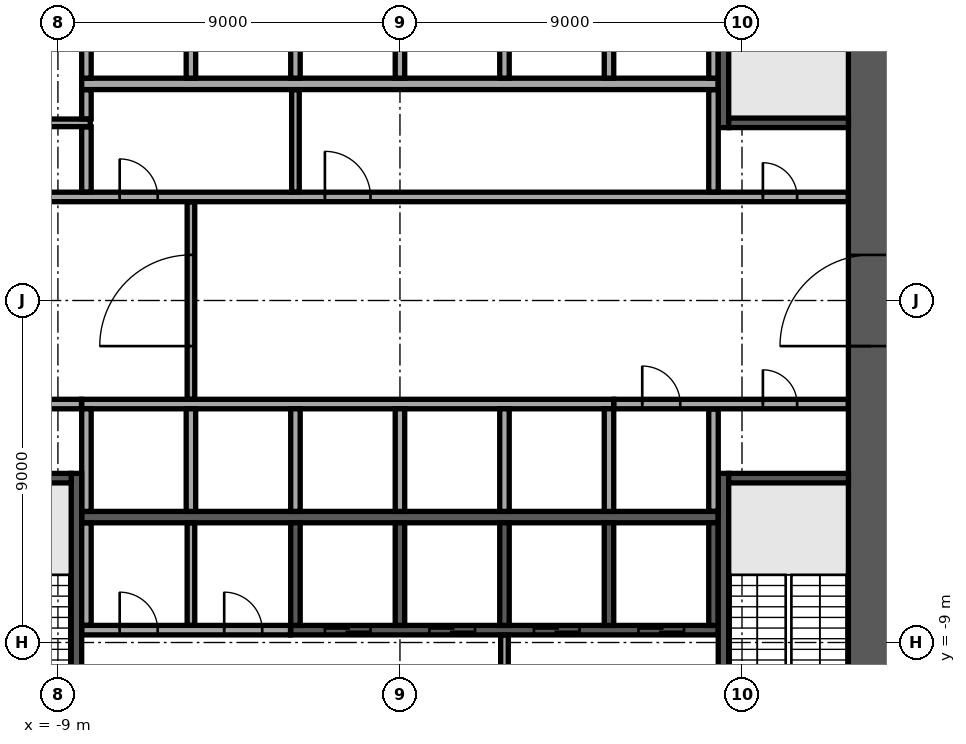
"""IFC4 building model, lengths in metres.
Left out: names, types, materials, properties, quantities, classifications, styles, units other than length and angle.
Written with IfcOpenShell. Run it as: python <this file> out.ifc"""

import sys

from ifc_helpers import new_model, si_unit, direction, frame, frame_2d, origin, place, context, subcontext, project, spatial, rectangle, extrude, element, fill, save


model = new_model("IFC4")
c1 = context("Model", 3, precision=1e-05, world=origin(), true_north=direction((0.0, 1.0)))
c2 = subcontext(c1, "Body", "Model", "MODEL_VIEW")
j1 = project(units=[si_unit("LENGTHUNIT", "METRE"), si_unit("PLANEANGLEUNIT", "RADIAN")], contexts=[c1])
p1 = place(None, origin())
s1 = spatial("IfcSite", under=j1, at=p1, CompositionType="ELEMENT")
p2 = place(p1, origin())
s2 = spatial("IfcBuilding", under=s1, at=p2, CompositionType="ELEMENT")
p3 = place(p2, frame((0.0, 0.0, 13.5)))
s3 = spatial("IfcBuildingStorey", under=s2, at=p3, CompositionType="ELEMENT", Elevation=13.5)
p4 = place(p3, frame((12.4, -11.8, 0.0), z_axis=(0.0, 0.0, 1.0), x_axis=(0.0, 1.0, 0.0)))
e1 = element("IfcWall", 1, at=p4, inside=s3, PredefinedType="SHEAR", context=c2, shape_type="SweptSolid", body=[
    extrude(rectangle(XDim=23.6, YDim=1.2, at=frame_2d((11.8, 0.0))), origin(), (0.0, 0.0, 1.0), 4.1),
])
p5 = place(p4, frame((10.6, 0.0, 0.0)))
e2 = element("IfcOpeningElement", 2, at=p5, cuts=e1, PredefinedType="OPENING", context=c2, shape_type="SweptSolid", body=[
    extrude(rectangle(XDim=2.4, YDim=2.4, at=frame_2d((1.2, 1.2))), frame((0.0, 0.61, 0.0), z_axis=(0.0, -1.0, 0.0), x_axis=(1.0, 0.0, 0.0)), (0.0, 0.0, 1.0), 1.22),
])
for number, where, z_axis, x_axis in (
    (3, (-8.375, 5.7, 0.0), (0.0, 0.0, 1.0), (1.0, 0.0, 0.0)),
    (4, (-8.375, -5.7, 0.0), (0.0, 0.0, 1.0), (1.0, 0.0, 0.0)),
):
    element("IfcWall", number, at=place(p3, frame(where, z_axis=z_axis, x_axis=x_axis)), inside=s3, PredefinedType="SOLIDWALL", context=c2, shape_type="SweptSolid", body=[
        extrude(rectangle(XDim=16.75, YDim=0.3, at=frame_2d((8.375, 0.0))), origin(), (0.0, 0.0, 1.0), 4.1),
    ])
for number, where, z_axis, x_axis in (
    (5, (-8.25, 5.85, 0.0), (0.0, 0.0, 1.0), (0.0, 1.0, 0.0)),
    (6, (-5.5, 5.85, 0.0), (0.0, 0.0, 1.0), (0.0, 1.0, 0.0)),
    (7, (-2.75, 5.85, 0.0), (0.0, 0.0, 1.0), (0.0, 1.0, 0.0)),
    (8, (0.0, 5.85, 0.0), (0.0, 0.0, 1.0), (0.0, 1.0, 0.0)),
    (9, (2.75, 5.85, 0.0), (0.0, 0.0, 1.0), (0.0, 1.0, 0.0)),
    (10, (5.5, 5.85, 0.0), (0.0, 0.0, 1.0), (0.0, 1.0, 0.0)),
    (11, (8.25, 5.85, 0.0), (0.0, 0.0, 1.0), (0.0, 1.0, 0.0)),
):
    element("IfcWall", number, at=place(p3, frame(where, z_axis=z_axis, x_axis=x_axis)), inside=s3, PredefinedType="SOLIDWALL", context=c2, shape_type="SweptSolid", body=[
        extrude(rectangle(XDim=2.7, YDim=0.25, at=frame_2d((1.35, 0.0))), origin(), (0.0, 0.0, 1.0), 4.1),
    ])
p6 = place(p3, frame((-8.375, -2.725, 0.0), z_axis=(0.0, 0.0, 1.0), x_axis=(1.0, 0.0, 0.0)))
e12 = element("IfcWall", 12, at=p6, inside=s3, PredefinedType="SOLIDWALL", context=c2, shape_type="SweptSolid", body=[
    extrude(rectangle(XDim=14.0, YDim=0.25, at=frame_2d((7.0, 0.0))), origin(), (0.0, 0.0, 1.0), 4.1),
])
for number, where, z_axis, x_axis in (
    (13, (-8.25, -5.55, 0.0), (0.0, 0.0, 1.0), (0.0, 1.0, 0.0)),
    (14, (-5.5, -5.55, 0.0), (0.0, 0.0, 1.0), (0.0, 1.0, 0.0)),
    (15, (-2.75, -5.55, 0.0), (0.0, 0.0, 1.0), (0.0, 1.0, 0.0)),
    (16, (0.0, -5.55, 0.0), (0.0, 0.0, 1.0), (0.0, 1.0, 0.0)),
    (17, (2.75, -5.55, 0.0), (0.0, 0.0, 1.0), (0.0, 1.0, 0.0)),
    (18, (5.5, -5.55, 0.0), (0.0, 0.0, 1.0), (0.0, 1.0, 0.0)),
):
    element("IfcWall", number, at=place(p3, frame(where, z_axis=z_axis, x_axis=x_axis)), inside=s3, PredefinedType="SOLIDWALL", context=c2, shape_type="SweptSolid", body=[
        extrude(rectangle(XDim=2.7, YDim=0.25, at=frame_2d((1.35, 0.0))), origin(), (0.0, 0.0, 1.0), 4.1),
    ])
p7 = place(p3, frame((-2.875, -8.675, 0.0), z_axis=(0.0, 0.0, 1.0), x_axis=(1.0, 0.0, 0.0)))
e19 = element("IfcWall", 19, at=p7, inside=s3, PredefinedType="SOLIDWALL", context=c2, shape_type="SweptSolid", body=[
    extrude(rectangle(XDim=11.25, YDim=0.25, at=frame_2d((5.625, 0.0))), origin(), (0.0, 0.0, 1.0), 4.1),
])
p8 = place(p7, frame((0.9, 0.0, 0.0)))
e20 = element("IfcOpeningElement", 20, at=p8, cuts=e19, PredefinedType="OPENING", context=c2, shape_type="SweptSolid", body=[
    extrude(rectangle(XDim=1.2, YDim=2.1, at=frame_2d((0.6, 1.05))), frame((0.0, 0.135, 0.0), z_axis=(0.0, -1.0, 0.0), x_axis=(1.0, 0.0, 0.0)), (0.0, 0.0, 1.0), 0.27),
])
p9 = place(p7, frame((3.65, 0.0, 0.0)))
e21 = element("IfcOpeningElement", 21, at=p9, cuts=e19, PredefinedType="OPENING", context=c2, shape_type="SweptSolid", body=[
    extrude(rectangle(XDim=1.2, YDim=2.1, at=frame_2d((0.6, 1.05))), frame((0.0, 0.135, 0.0), z_axis=(0.0, -1.0, 0.0), x_axis=(1.0, 0.0, 0.0)), (0.0, 0.0, 1.0), 0.27),
])
p10 = place(p7, frame((6.4, 0.0, 0.0)))
e22 = element("IfcOpeningElement", 22, at=p10, cuts=e19, PredefinedType="OPENING", context=c2, shape_type="SweptSolid", body=[
    extrude(rectangle(XDim=1.2, YDim=2.1, at=frame_2d((0.6, 1.05))), frame((0.0, 0.135, 0.0), z_axis=(0.0, -1.0, 0.0), x_axis=(1.0, 0.0, 0.0)), (0.0, 0.0, 1.0), 0.27),
])
p11 = place(p7, frame((9.15, 0.0, 0.0)))
e23 = element("IfcOpeningElement", 23, at=p11, cuts=e19, PredefinedType="OPENING", context=c2, shape_type="SweptSolid", body=[
    extrude(rectangle(XDim=1.2, YDim=2.1, at=frame_2d((0.6, 1.05))), frame((0.0, 0.135, 0.0), z_axis=(0.0, -1.0, 0.0), x_axis=(1.0, 0.0, 0.0)), (0.0, 0.0, 1.0), 0.27),
])
for number, where, z_axis, x_axis in (
    (24, (-2.75, -8.55, 0.0), (0.0, 0.0, 1.0), (0.0, 1.0, 0.0)),
    (25, (0.0, -8.55, 0.0), (0.0, 0.0, 1.0), (0.0, 1.0, 0.0)),
    (26, (2.75, -8.55, 0.0), (0.0, 0.0, 1.0), (0.0, 1.0, 0.0)),
    (27, (5.5, -8.55, 0.0), (0.0, 0.0, 1.0), (0.0, 1.0, 0.0)),
    (28, (8.25, -8.55, 0.0), (0.0, 0.0, 1.0), (0.0, 1.0, 0.0)),
):
    element("IfcWall", number, at=place(p3, frame(where, z_axis=z_axis, x_axis=x_axis)), inside=s3, PredefinedType="SOLIDWALL", context=c2, shape_type="SweptSolid", body=[
        extrude(rectangle(XDim=2.7, YDim=0.25, at=frame_2d((1.35, 0.0))), origin(), (0.0, 0.0, 1.0), 4.1),
    ])
p12 = place(p3, frame((8.512, 4.55, 0.0), z_axis=(0.0, 0.0, 1.0), x_axis=(0.0, 1.0, 0.0)))
e29 = element("IfcWall", 29, at=p12, inside=s3, PredefinedType="SOLIDWALL", context=c2, shape_type="SweptSolid", body=[
    extrude(rectangle(XDim=7.25, YDim=0.275, at=frame_2d((3.625, 0.0))), origin(), (0.0, 0.0, 1.0), 4.1),
])
p13 = place(p12, frame((6.0, 0.0, 0.0)))
e30 = element("IfcOpeningElement", 30, at=p13, cuts=e29, PredefinedType="OPENING", context=c2, shape_type="SweptSolid", body=[
    extrude(rectangle(XDim=1.0, YDim=2.1, at=frame_2d((0.5, 1.05))), frame((0.0, 0.147, 0.0), z_axis=(0.0, -1.0, 0.0), x_axis=(1.0, 0.0, 0.0)), (0.0, 0.0, 1.0), 0.295),
])
p14 = place(p3, frame((8.65, 4.675, 0.0), z_axis=(0.0, 0.0, 1.0), x_axis=(1.0, 0.0, 0.0)))
e31 = element("IfcWall", 31, at=p14, inside=s3, PredefinedType="SOLIDWALL", context=c2, shape_type="SweptSolid", body=[
    extrude(rectangle(XDim=3.15, YDim=0.25, at=frame_2d((1.575, 0.0))), origin(), (0.0, 0.0, 1.0), 4.1),
])
p15 = place(p3, frame((-8.512, -4.55, 0.0), z_axis=(0.0, 0.0, 1.0), x_axis=(0.0, -1.0, 0.0)))
e32 = element("IfcWall", 32, at=p15, inside=s3, PredefinedType="SOLIDWALL", context=c2, shape_type="SweptSolid", body=[
    extrude(rectangle(XDim=7.25, YDim=0.275, at=frame_2d((3.625, 0.0))), origin(), (0.0, 0.0, 1.0), 4.1),
])
p16 = place(p15, frame((6.0, 0.0, 0.0)))
e33 = element("IfcOpeningElement", 33, at=p16, cuts=e32, PredefinedType="OPENING", context=c2, shape_type="SweptSolid", body=[
    extrude(rectangle(XDim=1.0, YDim=2.1, at=frame_2d((0.5, 1.05))), frame((0.0, 0.147, 0.0), z_axis=(0.0, -1.0, 0.0), x_axis=(1.0, 0.0, 0.0)), (0.0, 0.0, 1.0), 0.295),
])
p17 = place(p3, frame((-8.65, -4.675, 0.0), z_axis=(0.0, 0.0, 1.0), x_axis=(-1.0, 0.0, 0.0)))
e34 = element("IfcWall", 34, at=p17, inside=s3, PredefinedType="SOLIDWALL", context=c2, shape_type="SweptSolid", body=[
    extrude(rectangle(XDim=3.15, YDim=0.25, at=frame_2d((1.575, 0.0))), origin(), (0.0, 0.0, 1.0), 4.1),
])
p18 = place(p3, frame((8.512, -4.55, 0.0), z_axis=(0.0, 0.0, 1.0), x_axis=(0.0, -1.0, 0.0)))
e35 = element("IfcWall", 35, at=p18, inside=s3, PredefinedType="SOLIDWALL", context=c2, shape_type="SweptSolid", body=[
    extrude(rectangle(XDim=7.25, YDim=0.275, at=frame_2d((3.625, 0.0))), origin(), (0.0, 0.0, 1.0), 4.1),
])
p19 = place(p18, frame((6.0, 0.0, 0.0)))
e36 = element("IfcOpeningElement", 36, at=p19, cuts=e35, PredefinedType="OPENING", context=c2, shape_type="SweptSolid", body=[
    extrude(rectangle(XDim=1.0, YDim=2.1, at=frame_2d((0.5, 1.05))), frame((0.0, 0.147, 0.0), z_axis=(0.0, -1.0, 0.0), x_axis=(1.0, 0.0, 0.0)), (0.0, 0.0, 1.0), 0.295),
])
p20 = place(p3, frame((8.65, -4.675, 0.0), z_axis=(0.0, 0.0, 1.0), x_axis=(1.0, 0.0, 0.0)))
e37 = element("IfcWall", 37, at=p20, inside=s3, PredefinedType="SOLIDWALL", context=c2, shape_type="SweptSolid", body=[
    extrude(rectangle(XDim=3.15, YDim=0.25, at=frame_2d((1.575, 0.0))), origin(), (0.0, 0.0, 1.0), 4.1),
])
p21 = place(p3, frame((2.75, -11.795, 0.0), z_axis=(0.0, 0.0, 1.0), x_axis=(0.0, 1.0, 0.0)))
e38 = element("IfcWall", 38, at=p21, inside=s3, PredefinedType="PARTITIONING", context=c2, shape_type="SweptSolid", body=[
    extrude(rectangle(XDim=2.99, YDim=0.2, at=frame_2d((1.495, 0.0))), origin(), (0.0, 0.0, 1.0), 4.1),
])
p22 = place(p3, frame((-8.37, -8.675, 0.0), z_axis=(0.0, 0.0, 1.0), x_axis=(1.0, 0.0, 0.0)))
e39 = element("IfcWall", 39, at=p22, inside=s3, PredefinedType="PARTITIONING", context=c2, shape_type="SweptSolid", body=[
    extrude(rectangle(XDim=5.49, YDim=0.25, at=frame_2d((2.745, 0.0))), origin(), (0.0, 0.0, 1.0), 4.1),
])
p23 = place(p22, frame((0.995, 0.0, 0.0)))
e40 = element("IfcOpeningElement", 40, at=p23, cuts=e39, PredefinedType="OPENING", context=c2, shape_type="SweptSolid", body=[
    extrude(rectangle(XDim=1.0, YDim=2.1, at=frame_2d((0.5, 1.05))), frame((0.0, 0.135, 0.0), z_axis=(0.0, -1.0, 0.0), x_axis=(1.0, 0.0, 0.0)), (0.0, 0.0, 1.0), 0.27),
])
p24 = place(p22, frame((3.745, 0.0, 0.0)))
e41 = element("IfcOpeningElement", 41, at=p24, cuts=e39, PredefinedType="OPENING", context=c2, shape_type="SweptSolid", body=[
    extrude(rectangle(XDim=1.0, YDim=2.1, at=frame_2d((0.5, 1.05))), frame((0.0, 0.135, 0.0), z_axis=(0.0, -1.0, 0.0), x_axis=(1.0, 0.0, 0.0)), (0.0, 0.0, 1.0), 0.27),
])
p25 = place(p3, frame((-8.25, -8.545, 0.0), z_axis=(0.0, 0.0, 1.0), x_axis=(0.0, 1.0, 0.0)))
e42 = element("IfcWall", 42, at=p25, inside=s3, PredefinedType="PARTITIONING", context=c2, shape_type="SweptSolid", body=[
    extrude(rectangle(XDim=2.69, YDim=0.25, at=frame_2d((1.345, 0.0))), origin(), (0.0, 0.0, 1.0), 4.1),
])
p26 = place(p3, frame((-5.5, -8.545, 0.0), z_axis=(0.0, 0.0, 1.0), x_axis=(0.0, 1.0, 0.0)))
e43 = element("IfcWall", 43, at=p26, inside=s3, PredefinedType="PARTITIONING", context=c2, shape_type="SweptSolid", body=[
    extrude(rectangle(XDim=2.69, YDim=0.2, at=frame_2d((1.345, 0.0))), origin(), (0.0, 0.0, 1.0), 4.1),
])
p27 = place(p3, frame((8.25, -5.545, 0.0), z_axis=(0.0, 0.0, 1.0), x_axis=(0.0, 1.0, 0.0)))
e44 = element("IfcWall", 44, at=p27, inside=s3, PredefinedType="PARTITIONING", context=c2, shape_type="SweptSolid", body=[
    extrude(rectangle(XDim=2.69, YDim=0.25, at=frame_2d((1.345, 0.0))), origin(), (0.0, 0.0, 1.0), 4.1),
])
p28 = place(p3, frame((-11.795, -2.725, 0.0), z_axis=(0.0, 0.0, 1.0), x_axis=(1.0, 0.0, 0.0)))
e45 = element("IfcWall", 45, at=p28, inside=s3, PredefinedType="PARTITIONING", context=c2, shape_type="SweptSolid", body=[
    extrude(rectangle(XDim=3.415, YDim=0.25, at=frame_2d((1.708, 0.0))), origin(), (0.0, 0.0, 1.0), 4.1),
])
p29 = place(p28, frame((1.295, 0.0, 0.0)))
e46 = element("IfcOpeningElement", 46, at=p29, cuts=e45, PredefinedType="OPENING", context=c2, shape_type="SweptSolid", body=[
    extrude(rectangle(XDim=1.0, YDim=2.1, at=frame_2d((0.5, 1.05))), frame((0.0, 0.135, 0.0), z_axis=(0.0, -1.0, 0.0), x_axis=(1.0, 0.0, 0.0)), (0.0, 0.0, 1.0), 0.27),
])
p30 = place(p3, frame((5.63, -2.725, 0.0), z_axis=(0.0, 0.0, 1.0), x_axis=(1.0, 0.0, 0.0)))
e47 = element("IfcWall", 47, at=p30, inside=s3, PredefinedType="PARTITIONING", context=c2, shape_type="SweptSolid", body=[
    extrude(rectangle(XDim=6.165, YDim=0.25, at=frame_2d((3.083, 0.0))), origin(), (0.0, 0.0, 1.0), 4.1),
])
p31 = place(p30, frame((0.745, 0.0, 0.0)))
e48 = element("IfcOpeningElement", 48, at=p31, cuts=e47, PredefinedType="OPENING", context=c2, shape_type="SweptSolid", body=[
    extrude(rectangle(XDim=1.0, YDim=2.1, at=frame_2d((0.5, 1.05))), frame((0.0, 0.135, 0.0), z_axis=(0.0, -1.0, 0.0), x_axis=(1.0, 0.0, 0.0)), (0.0, 0.0, 1.0), 0.27),
])
p32 = place(p30, frame((3.92, 0.0, 0.0)))
e49 = element("IfcOpeningElement", 49, at=p32, cuts=e47, PredefinedType="OPENING", context=c2, shape_type="SweptSolid", body=[
    extrude(rectangle(XDim=0.9, YDim=2.1, at=frame_2d((0.45, 1.05))), frame((0.0, 0.135, 0.0), z_axis=(0.0, -1.0, 0.0), x_axis=(1.0, 0.0, 0.0)), (0.0, 0.0, 1.0), 0.27),
])
p33 = place(p3, frame((-5.5, -2.595, 0.0), z_axis=(0.0, 0.0, 1.0), x_axis=(0.0, 1.0, 0.0)))
e50 = element("IfcWall", 50, at=p33, inside=s3, PredefinedType="PARTITIONING", context=c2, shape_type="SweptSolid", body=[
    extrude(rectangle(XDim=5.19, YDim=0.2, at=frame_2d((2.595, 0.0))), origin(), (0.0, 0.0, 1.0), 4.1),
])
p34 = place(p33, frame((1.395, 0.0, 0.0)))
e51 = element("IfcOpeningElement", 51, at=p34, cuts=e50, PredefinedType="OPENING", context=c2, shape_type="SweptSolid", body=[
    extrude(rectangle(XDim=2.4, YDim=2.4, at=frame_2d((1.2, 1.2))), frame((0.0, 0.11, 0.0), z_axis=(0.0, -1.0, 0.0), x_axis=(1.0, 0.0, 0.0)), (0.0, 0.0, 1.0), 0.22),
])
p35 = place(p3, frame((-11.795, 2.725, 0.0), z_axis=(0.0, 0.0, 1.0), x_axis=(1.0, 0.0, 0.0)))
e52 = element("IfcWall", 52, at=p35, inside=s3, PredefinedType="PARTITIONING", context=c2, shape_type="SweptSolid", body=[
    extrude(rectangle(XDim=23.59, YDim=0.25, at=frame_2d((11.795, 0.0))), origin(), (0.0, 0.0, 1.0), 4.1),
])
p36 = place(p35, frame((21.345, 0.0, 0.0)))
e53 = element("IfcOpeningElement", 53, at=p36, cuts=e52, PredefinedType="OPENING", context=c2, shape_type="SweptSolid", body=[
    extrude(rectangle(XDim=0.9, YDim=2.1, at=frame_2d((0.45, 1.05))), frame((0.0, 0.135, 0.0), z_axis=(0.0, -1.0, 0.0), x_axis=(1.0, 0.0, 0.0)), (0.0, 0.0, 1.0), 0.27),
])
p37 = place(p35, frame((1.345, 0.0, 0.0)))
e54 = element("IfcOpeningElement", 54, at=p37, cuts=e52, PredefinedType="OPENING", context=c2, shape_type="SweptSolid", body=[
    extrude(rectangle(XDim=0.9, YDim=2.1, at=frame_2d((0.45, 1.05))), frame((0.0, 0.135, 0.0), z_axis=(0.0, -1.0, 0.0), x_axis=(1.0, 0.0, 0.0)), (0.0, 0.0, 1.0), 0.27),
])
p38 = place(p35, frame((4.42, 0.0, 0.0)))
e55 = element("IfcOpeningElement", 55, at=p38, cuts=e52, PredefinedType="OPENING", context=c2, shape_type="SweptSolid", body=[
    extrude(rectangle(XDim=1.0, YDim=2.1, at=frame_2d((0.5, 1.05))), frame((0.0, 0.135, 0.0), z_axis=(0.0, -1.0, 0.0), x_axis=(1.0, 0.0, 0.0)), (0.0, 0.0, 1.0), 0.27),
])
p39 = place(p35, frame((9.82, 0.0, 0.0)))
e56 = element("IfcOpeningElement", 56, at=p39, cuts=e52, PredefinedType="OPENING", context=c2, shape_type="SweptSolid", body=[
    extrude(rectangle(XDim=1.2, YDim=2.1, at=frame_2d((0.6, 1.05))), frame((0.0, 0.135, 0.0), z_axis=(0.0, -1.0, 0.0), x_axis=(1.0, 0.0, 0.0)), (0.0, 0.0, 1.0), 0.27),
])
p40 = place(p3, frame((-8.25, 2.855, 0.0), z_axis=(0.0, 0.0, 1.0), x_axis=(0.0, 1.0, 0.0)))
e57 = element("IfcWall", 57, at=p40, inside=s3, PredefinedType="PARTITIONING", context=c2, shape_type="SweptSolid", body=[
    extrude(rectangle(XDim=1.715, YDim=0.25, at=frame_2d((0.857, 0.0))), origin(), (0.0, 0.0, 1.0), 4.1),
])
p41 = place(p3, frame((-2.75, 2.855, 0.0), z_axis=(0.0, 0.0, 1.0), x_axis=(0.0, 1.0, 0.0)))
e58 = element("IfcWall", 58, at=p41, inside=s3, PredefinedType="PARTITIONING", context=c2, shape_type="SweptSolid", body=[
    extrude(rectangle(XDim=2.69, YDim=0.2, at=frame_2d((1.345, 0.0))), origin(), (0.0, 0.0, 1.0), 4.1),
])
p42 = place(p3, frame((8.25, 2.855, 0.0), z_axis=(0.0, 0.0, 1.0), x_axis=(0.0, 1.0, 0.0)))
e59 = element("IfcWall", 59, at=p42, inside=s3, PredefinedType="PARTITIONING", context=c2, shape_type="SweptSolid", body=[
    extrude(rectangle(XDim=2.69, YDim=0.25, at=frame_2d((1.345, 0.0))), origin(), (0.0, 0.0, 1.0), 4.1),
])
p43 = place(p3, frame((-11.795, 4.675, 0.0), z_axis=(0.0, 0.0, 1.0), x_axis=(1.0, 0.0, 0.0)))
e60 = element("IfcWall", 60, at=p43, inside=s3, PredefinedType="PARTITIONING", context=c2, shape_type="SweptSolid", body=[
    extrude(rectangle(XDim=3.645, YDim=0.2, at=frame_2d((1.823, 0.0))), origin(), (0.0, 0.0, 1.0), 4.1),
])
p44 = place(p3, frame((-8.25, 4.78, 0.0), z_axis=(0.0, 0.0, 1.0), x_axis=(0.0, 1.0, 0.0)))
e61 = element("IfcWall", 61, at=p44, inside=s3, PredefinedType="PARTITIONING", context=c2, shape_type="SweptSolid", body=[
    extrude(rectangle(XDim=0.765, YDim=0.25, at=frame_2d((0.382, 0.0))), origin(), (0.0, 0.0, 1.0), 4.1),
])
p45 = place(p5, origin())
e62 = element("IfcDoor", 62, at=p45, inside=s3, OperationType="SINGLE_SWING_LEFT", PredefinedType="DOOR", context=c2, shape_type="SweptSolid", body=[
    extrude(rectangle(XDim=2.4, YDim=2.4, at=frame_2d((1.2, 1.2))), frame((0.0, 0.025, 0.0), z_axis=(0.0, -1.0, 0.0), x_axis=(1.0, 0.0, 0.0)), (0.0, 0.0, 1.0), 0.05),
])
fill(e2, e62)
p46 = place(p8, origin())
e63 = element("IfcDoor", 63, at=p46, inside=s3, OperationType="DOUBLE_DOOR_SLIDING", PredefinedType="DOOR", context=c2, shape_type="SweptSolid", body=[
    extrude(rectangle(XDim=1.2, YDim=2.1, at=frame_2d((0.6, 1.05))), frame((0.0, 0.025, 0.0), z_axis=(0.0, -1.0, 0.0), x_axis=(1.0, 0.0, 0.0)), (0.0, 0.0, 1.0), 0.05),
])
fill(e20, e63)
p47 = place(p9, origin())
e64 = element("IfcDoor", 64, at=p47, inside=s3, OperationType="DOUBLE_DOOR_SLIDING", PredefinedType="DOOR", context=c2, shape_type="SweptSolid", body=[
    extrude(rectangle(XDim=1.2, YDim=2.1, at=frame_2d((0.6, 1.05))), frame((0.0, 0.025, 0.0), z_axis=(0.0, -1.0, 0.0), x_axis=(1.0, 0.0, 0.0)), (0.0, 0.0, 1.0), 0.05),
])
fill(e21, e64)
p48 = place(p10, origin())
e65 = element("IfcDoor", 65, at=p48, inside=s3, OperationType="DOUBLE_DOOR_SLIDING", PredefinedType="DOOR", context=c2, shape_type="SweptSolid", body=[
    extrude(rectangle(XDim=1.2, YDim=2.1, at=frame_2d((0.6, 1.05))), frame((0.0, 0.025, 0.0), z_axis=(0.0, -1.0, 0.0), x_axis=(1.0, 0.0, 0.0)), (0.0, 0.0, 1.0), 0.05),
])
fill(e22, e65)
p49 = place(p11, origin())
e66 = element("IfcDoor", 66, at=p49, inside=s3, OperationType="DOUBLE_DOOR_SLIDING", PredefinedType="DOOR", context=c2, shape_type="SweptSolid", body=[
    extrude(rectangle(XDim=1.2, YDim=2.1, at=frame_2d((0.6, 1.05))), frame((0.0, 0.025, 0.0), z_axis=(0.0, -1.0, 0.0), x_axis=(1.0, 0.0, 0.0)), (0.0, 0.0, 1.0), 0.05),
])
fill(e23, e66)
p50 = place(p23, origin())
e67 = element("IfcDoor", 67, at=p50, inside=s3, OperationType="SINGLE_SWING_RIGHT", PredefinedType="DOOR", context=c2, shape_type="SweptSolid", body=[
    extrude(rectangle(XDim=1.0, YDim=2.1, at=frame_2d((0.5, 1.05))), frame((0.0, 0.025, 0.0), z_axis=(0.0, -1.0, 0.0), x_axis=(1.0, 0.0, 0.0)), (0.0, 0.0, 1.0), 0.05),
])
fill(e40, e67)
p51 = place(p24, origin())
e68 = element("IfcDoor", 68, at=p51, inside=s3, OperationType="SINGLE_SWING_RIGHT", PredefinedType="DOOR", context=c2, shape_type="SweptSolid", body=[
    extrude(rectangle(XDim=1.0, YDim=2.1, at=frame_2d((0.5, 1.05))), frame((0.0, 0.025, 0.0), z_axis=(0.0, -1.0, 0.0), x_axis=(1.0, 0.0, 0.0)), (0.0, 0.0, 1.0), 0.05),
])
fill(e41, e68)
p52 = place(p31, origin())
e69 = element("IfcDoor", 69, at=p52, inside=s3, OperationType="SINGLE_SWING_RIGHT", PredefinedType="DOOR", context=c2, shape_type="SweptSolid", body=[
    extrude(rectangle(XDim=1.0, YDim=2.1, at=frame_2d((0.5, 1.05))), frame((0.0, 0.025, 0.0), z_axis=(0.0, -1.0, 0.0), x_axis=(1.0, 0.0, 0.0)), (0.0, 0.0, 1.0), 0.05),
])
fill(e48, e69)
p53 = place(p36, origin())
e70 = element("IfcDoor", 70, at=p53, inside=s3, OperationType="SINGLE_SWING_RIGHT", PredefinedType="DOOR", context=c2, shape_type="SweptSolid", body=[
    extrude(rectangle(XDim=0.9, YDim=2.1, at=frame_2d((0.45, 1.05))), frame((0.0, 0.025, 0.0), z_axis=(0.0, -1.0, 0.0), x_axis=(1.0, 0.0, 0.0)), (0.0, 0.0, 1.0), 0.05),
])
fill(e53, e70)
p54 = place(p32, origin())
e71 = element("IfcDoor", 71, at=p54, inside=s3, OperationType="SINGLE_SWING_RIGHT", PredefinedType="DOOR", context=c2, shape_type="SweptSolid", body=[
    extrude(rectangle(XDim=0.9, YDim=2.1, at=frame_2d((0.45, 1.05))), frame((0.0, 0.025, 0.0), z_axis=(0.0, -1.0, 0.0), x_axis=(1.0, 0.0, 0.0)), (0.0, 0.0, 1.0), 0.05),
])
fill(e49, e71)
p55 = place(p38, origin())
e72 = element("IfcDoor", 72, at=p55, inside=s3, OperationType="SINGLE_SWING_RIGHT", PredefinedType="DOOR", context=c2, shape_type="SweptSolid", body=[
    extrude(rectangle(XDim=1.0, YDim=2.1, at=frame_2d((0.5, 1.05))), frame((0.0, 0.025, 0.0), z_axis=(0.0, -1.0, 0.0), x_axis=(1.0, 0.0, 0.0)), (0.0, 0.0, 1.0), 0.05),
])
fill(e55, e72)
p56 = place(p39, origin())
e73 = element("IfcDoor", 73, at=p56, inside=s3, OperationType="SINGLE_SWING_LEFT", PredefinedType="DOOR", context=c2, shape_type="SweptSolid", body=[
    extrude(rectangle(XDim=1.2, YDim=2.1, at=frame_2d((0.6, 1.05))), frame((0.0, 0.025, 0.0), z_axis=(0.0, -1.0, 0.0), x_axis=(1.0, 0.0, 0.0)), (0.0, 0.0, 1.0), 0.05),
])
fill(e56, e73)
p57 = place(p34, origin())
e74 = element("IfcDoor", 74, at=p57, inside=s3, OperationType="DOUBLE_DOOR_DOUBLE_SWING", PredefinedType="DOOR", context=c2, shape_type="SweptSolid", body=[
    extrude(rectangle(XDim=2.4, YDim=2.4, at=frame_2d((1.2, 1.2))), frame((0.0, 0.025, 0.0), z_axis=(0.0, -1.0, 0.0), x_axis=(1.0, 0.0, 0.0)), (0.0, 0.0, 1.0), 0.05),
])
fill(e51, e74)
save(model, sys.argv[1])
